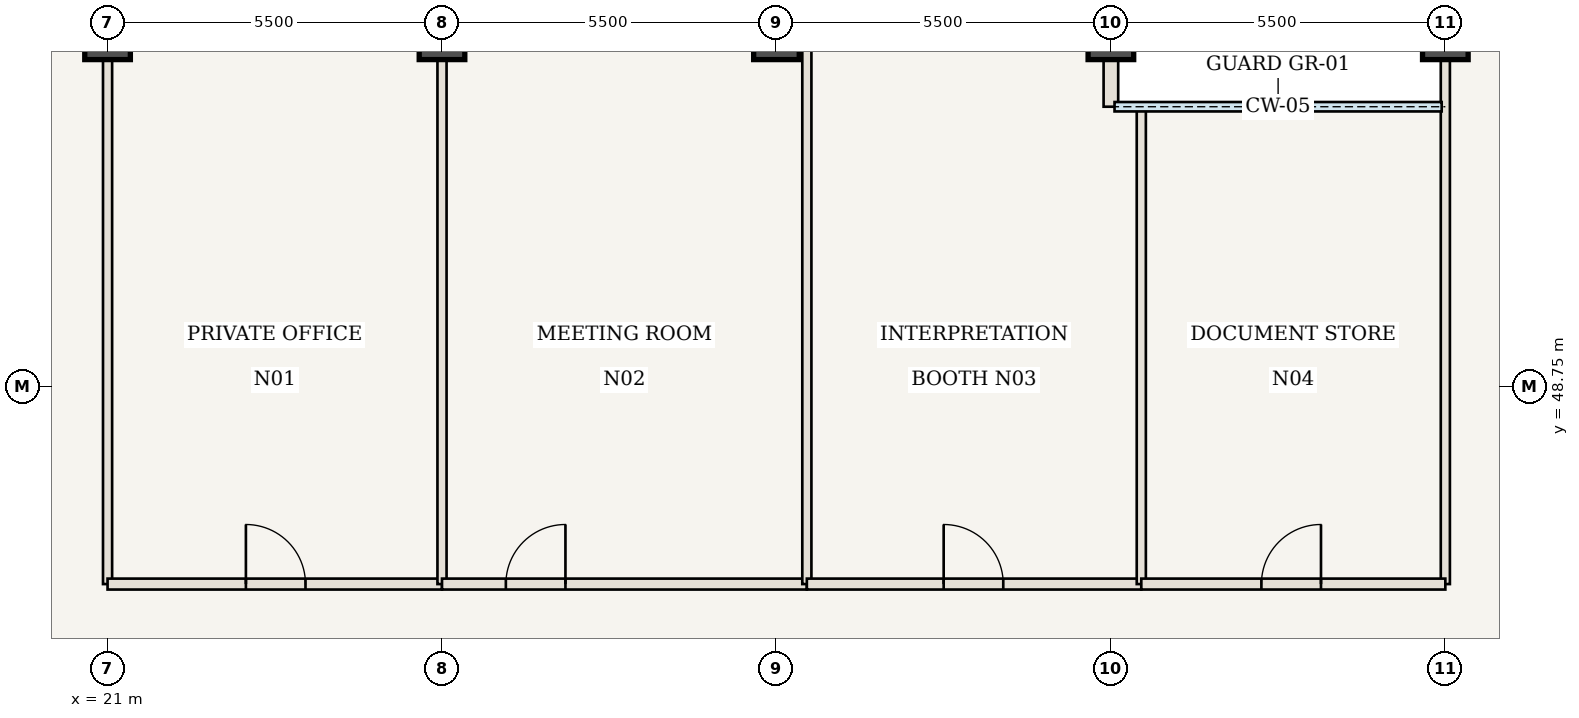
"""IFC4 building model, lengths in metres.
Left out: names, types, materials, properties, quantities, classifications, styles, units other than length and angle.
Written with IfcOpenShell. Run it as: python <this file> out.ifc"""

import sys

from ifc_helpers import new_model, si_unit, direction, frame, frame_2d, origin, origin_2d, place, context, subcontext, project, spatial, rectangle, extrude, element, fill, save


model = new_model("IFC4")
c1 = context("Model", 3, precision=1e-05, world=origin(), true_north=direction((0.0, 1.0)))
c2 = subcontext(c1, "Body", "Model", "MODEL_VIEW")
j1 = project(units=[si_unit("LENGTHUNIT", "METRE"), si_unit("PLANEANGLEUNIT", "RADIAN")], contexts=[c1])
p1 = place(None, origin())
s1 = spatial("IfcSite", under=j1, at=p1, CompositionType="ELEMENT")
p2 = place(p1, origin())
s2 = spatial("IfcBuilding", under=s1, at=p2, CompositionType="ELEMENT")
p3 = place(p2, frame((0.0, 0.0, 281.4)))
s3 = spatial("IfcBuildingStorey", under=s2, at=p3, CompositionType="ELEMENT", Elevation=281.4)
for number, where, z_axis, x_axis in (
    (1, (21.0, 54.5, 0.0), (0.0, 0.0, 1.0), (1.0, 0.0, 0.0)),
    (2, (26.5, 54.5, 0.0), (0.0, 0.0, 1.0), (1.0, 0.0, 0.0)),
    (3, (32.0, 54.5, 0.0), (0.0, 0.0, 1.0), (1.0, 0.0, 0.0)),
    (4, (37.5, 54.5, 0.0), (0.0, 0.0, 1.0), (1.0, 0.0, 0.0)),
    (5, (43.0, 54.5, 0.0), (0.0, 0.0, 1.0), (1.0, 0.0, 0.0)),
):
    element("IfcColumn", number, at=place(p3, frame(where, z_axis=z_axis, x_axis=x_axis)), inside=s3, PredefinedType="COLUMN", context=c2, shape_type="SweptSolid", body=[
        extrude(rectangle(XDim=0.75, YDim=0.75, at=origin_2d()), origin(), (0.0, 0.0, 1.0), 3.85),
    ])
for number, where, z_axis, x_axis in (
    (6, (21.0, 45.5, 0.0), (0.0, 0.0, 1.0), (0.0, 1.0, 0.0)),
    (7, (43.0, 45.5, 0.0), (0.0, 0.0, 1.0), (0.0, 1.0, 0.0)),
):
    element("IfcWall", number, at=place(p3, frame(where, z_axis=z_axis, x_axis=x_axis)), inside=s3, PredefinedType="STANDARD", context=c2, shape_type="SweptSolid", body=[
        extrude(rectangle(XDim=8.94, YDim=0.15, at=frame_2d((4.47, 0.0))), origin(), (0.0, 0.0, 1.0), 3.685),
    ])
p4 = place(p3, frame((21.0, 45.5, 0.0), z_axis=(0.0, 0.0, 1.0), x_axis=(1.0, 0.0, 0.0)))
e8 = element("IfcWall", 8, at=p4, inside=s3, PredefinedType="STANDARD", context=c2, shape_type="SweptSolid", body=[
    extrude(rectangle(XDim=5.5, YDim=0.18, at=frame_2d((2.75, 0.0))), origin(), (0.0, 0.0, 1.0), 3.685),
])
p5 = place(p4, frame((2.275, 0.0, 0.0)))
e9 = element("IfcOpeningElement", 9, at=p5, cuts=e8, PredefinedType="OPENING", context=c2, shape_type="SweptSolid", body=[
    extrude(rectangle(XDim=0.98, YDim=2.2, at=frame_2d((0.49, 1.1))), frame((0.0, 0.1, 0.0), z_axis=(0.0, -1.0, 0.0), x_axis=(1.0, 0.0, 0.0)), (0.0, 0.0, 1.0), 0.2),
])
p6 = place(p3, frame((26.5, 45.5, 0.0), z_axis=(0.0, 0.0, 1.0), x_axis=(0.0, 1.0, 0.0)))
e10 = element("IfcWall", 10, at=p6, inside=s3, PredefinedType="STANDARD", context=c2, shape_type="SweptSolid", body=[
    extrude(rectangle(XDim=8.94, YDim=0.15, at=frame_2d((4.47, 0.0))), origin(), (0.0, 0.0, 1.0), 3.685),
])
p7 = place(p3, frame((26.5, 45.5, 0.0), z_axis=(0.0, 0.0, 1.0), x_axis=(1.0, 0.0, 0.0)))
e11 = element("IfcWall", 11, at=p7, inside=s3, PredefinedType="STANDARD", context=c2, shape_type="SweptSolid", body=[
    extrude(rectangle(XDim=6.0, YDim=0.18, at=frame_2d((3.0, 0.0))), origin(), (0.0, 0.0, 1.0), 3.685),
])
p8 = place(p7, frame((1.05, 0.0, 0.0)))
e12 = element("IfcOpeningElement", 12, at=p8, cuts=e11, PredefinedType="OPENING", context=c2, shape_type="SweptSolid", body=[
    extrude(rectangle(XDim=0.98, YDim=2.2, at=frame_2d((0.49, 1.1))), frame((0.0, 0.1, 0.0), z_axis=(0.0, -1.0, 0.0), x_axis=(1.0, 0.0, 0.0)), (0.0, 0.0, 1.0), 0.2),
])
p9 = place(p3, frame((32.5, 45.5, 0.0), z_axis=(0.0, 0.0, 1.0), x_axis=(0.0, 1.0, 0.0)))
e13 = element("IfcWall", 13, at=p9, inside=s3, PredefinedType="STANDARD", context=c2, shape_type="SweptSolid", body=[
    extrude(rectangle(XDim=8.94, YDim=0.15, at=frame_2d((4.47, 0.0))), origin(), (0.0, 0.0, 1.0), 3.685),
])
p10 = place(p3, frame((32.5, 45.5, 0.0), z_axis=(0.0, 0.0, 1.0), x_axis=(1.0, 0.0, 0.0)))
e14 = element("IfcWall", 14, at=p10, inside=s3, PredefinedType="STANDARD", context=c2, shape_type="SweptSolid", body=[
    extrude(rectangle(XDim=5.5, YDim=0.18, at=frame_2d((2.75, 0.0))), origin(), (0.0, 0.0, 1.0), 3.685),
])
p11 = place(p10, frame((2.25, 0.0, 0.0)))
e15 = element("IfcOpeningElement", 15, at=p11, cuts=e14, PredefinedType="OPENING", context=c2, shape_type="SweptSolid", body=[
    extrude(rectangle(XDim=0.98, YDim=2.2, at=frame_2d((0.49, 1.1))), frame((0.0, 0.1, 0.0), z_axis=(0.0, -1.0, 0.0), x_axis=(1.0, 0.0, 0.0)), (0.0, 0.0, 1.0), 0.2),
])
p12 = place(p3, frame((38.0, 45.5, 0.0), z_axis=(0.0, 0.0, 1.0), x_axis=(0.0, 1.0, 0.0)))
e16 = element("IfcWall", 16, at=p12, inside=s3, PredefinedType="STANDARD", context=c2, shape_type="SweptSolid", body=[
    extrude(rectangle(XDim=7.84, YDim=0.15, at=frame_2d((3.92, 0.0))), origin(), (0.0, 0.0, 1.0), 3.685),
])
p13 = place(p3, frame((38.0, 45.5, 0.0), z_axis=(0.0, 0.0, 1.0), x_axis=(1.0, 0.0, 0.0)))
e17 = element("IfcWall", 17, at=p13, inside=s3, PredefinedType="STANDARD", context=c2, shape_type="SweptSolid", body=[
    extrude(rectangle(XDim=5.0, YDim=0.18, at=frame_2d((2.5, 0.0))), origin(), (0.0, 0.0, 1.0), 3.685),
])
p14 = place(p13, frame((1.975, 0.0, 0.0)))
e18 = element("IfcOpeningElement", 18, at=p14, cuts=e17, PredefinedType="OPENING", context=c2, shape_type="SweptSolid", body=[
    extrude(rectangle(XDim=0.98, YDim=2.2, at=frame_2d((0.49, 1.1))), frame((0.0, 0.1, 0.0), z_axis=(0.0, -1.0, 0.0), x_axis=(1.0, 0.0, 0.0)), (0.0, 0.0, 1.0), 0.2),
])
p15 = place(p3, frame((37.5, 54.5, 0.0), z_axis=(0.0, 0.0, 1.0), x_axis=(0.0, -1.0, 0.0)))
e19 = element("IfcWall", 19, at=p15, inside=s3, PredefinedType="USERDEFINED", context=c2, shape_type="SweptSolid", body=[
    extrude(rectangle(XDim=1.15, YDim=0.24, at=frame_2d((0.575, 0.0))), origin(), (0.0, 0.0, 1.0), 2.985),
])
p16 = place(p5, origin())
e20 = element("IfcDoor", 20, at=p16, inside=s3, OperationType="SINGLE_SWING_LEFT", PredefinedType="DOOR", context=c2, shape_type="SweptSolid", body=[
    extrude(rectangle(XDim=0.98, YDim=2.2, at=frame_2d((0.49, 1.1))), frame((0.0, 0.025, 0.0), z_axis=(0.0, -1.0, 0.0), x_axis=(1.0, 0.0, 0.0)), (0.0, 0.0, 1.0), 0.05),
])
fill(e9, e20)
p17 = place(p8, origin())
e21 = element("IfcDoor", 21, at=p17, inside=s3, OperationType="SINGLE_SWING_RIGHT", PredefinedType="DOOR", context=c2, shape_type="SweptSolid", body=[
    extrude(rectangle(XDim=0.98, YDim=2.2, at=frame_2d((0.49, 1.1))), frame((0.0, 0.025, 0.0), z_axis=(0.0, -1.0, 0.0), x_axis=(1.0, 0.0, 0.0)), (0.0, 0.0, 1.0), 0.05),
])
fill(e12, e21)
p18 = place(p11, origin())
e22 = element("IfcDoor", 22, at=p18, inside=s3, OperationType="SINGLE_SWING_LEFT", PredefinedType="DOOR", context=c2, shape_type="SweptSolid", body=[
    extrude(rectangle(XDim=0.98, YDim=2.2, at=frame_2d((0.49, 1.1))), frame((0.0, 0.025, 0.0), z_axis=(0.0, -1.0, 0.0), x_axis=(1.0, 0.0, 0.0)), (0.0, 0.0, 1.0), 0.05),
])
fill(e15, e22)
p19 = place(p14, origin())
e23 = element("IfcDoor", 23, at=p19, inside=s3, OperationType="SINGLE_SWING_RIGHT", PredefinedType="DOOR", context=c2, shape_type="SweptSolid", body=[
    extrude(rectangle(XDim=0.98, YDim=2.2, at=frame_2d((0.49, 1.1))), frame((0.0, 0.025, 0.0), z_axis=(0.0, -1.0, 0.0), x_axis=(1.0, 0.0, 0.0)), (0.0, 0.0, 1.0), 0.05),
])
fill(e18, e23)
save(model, sys.argv[1])
